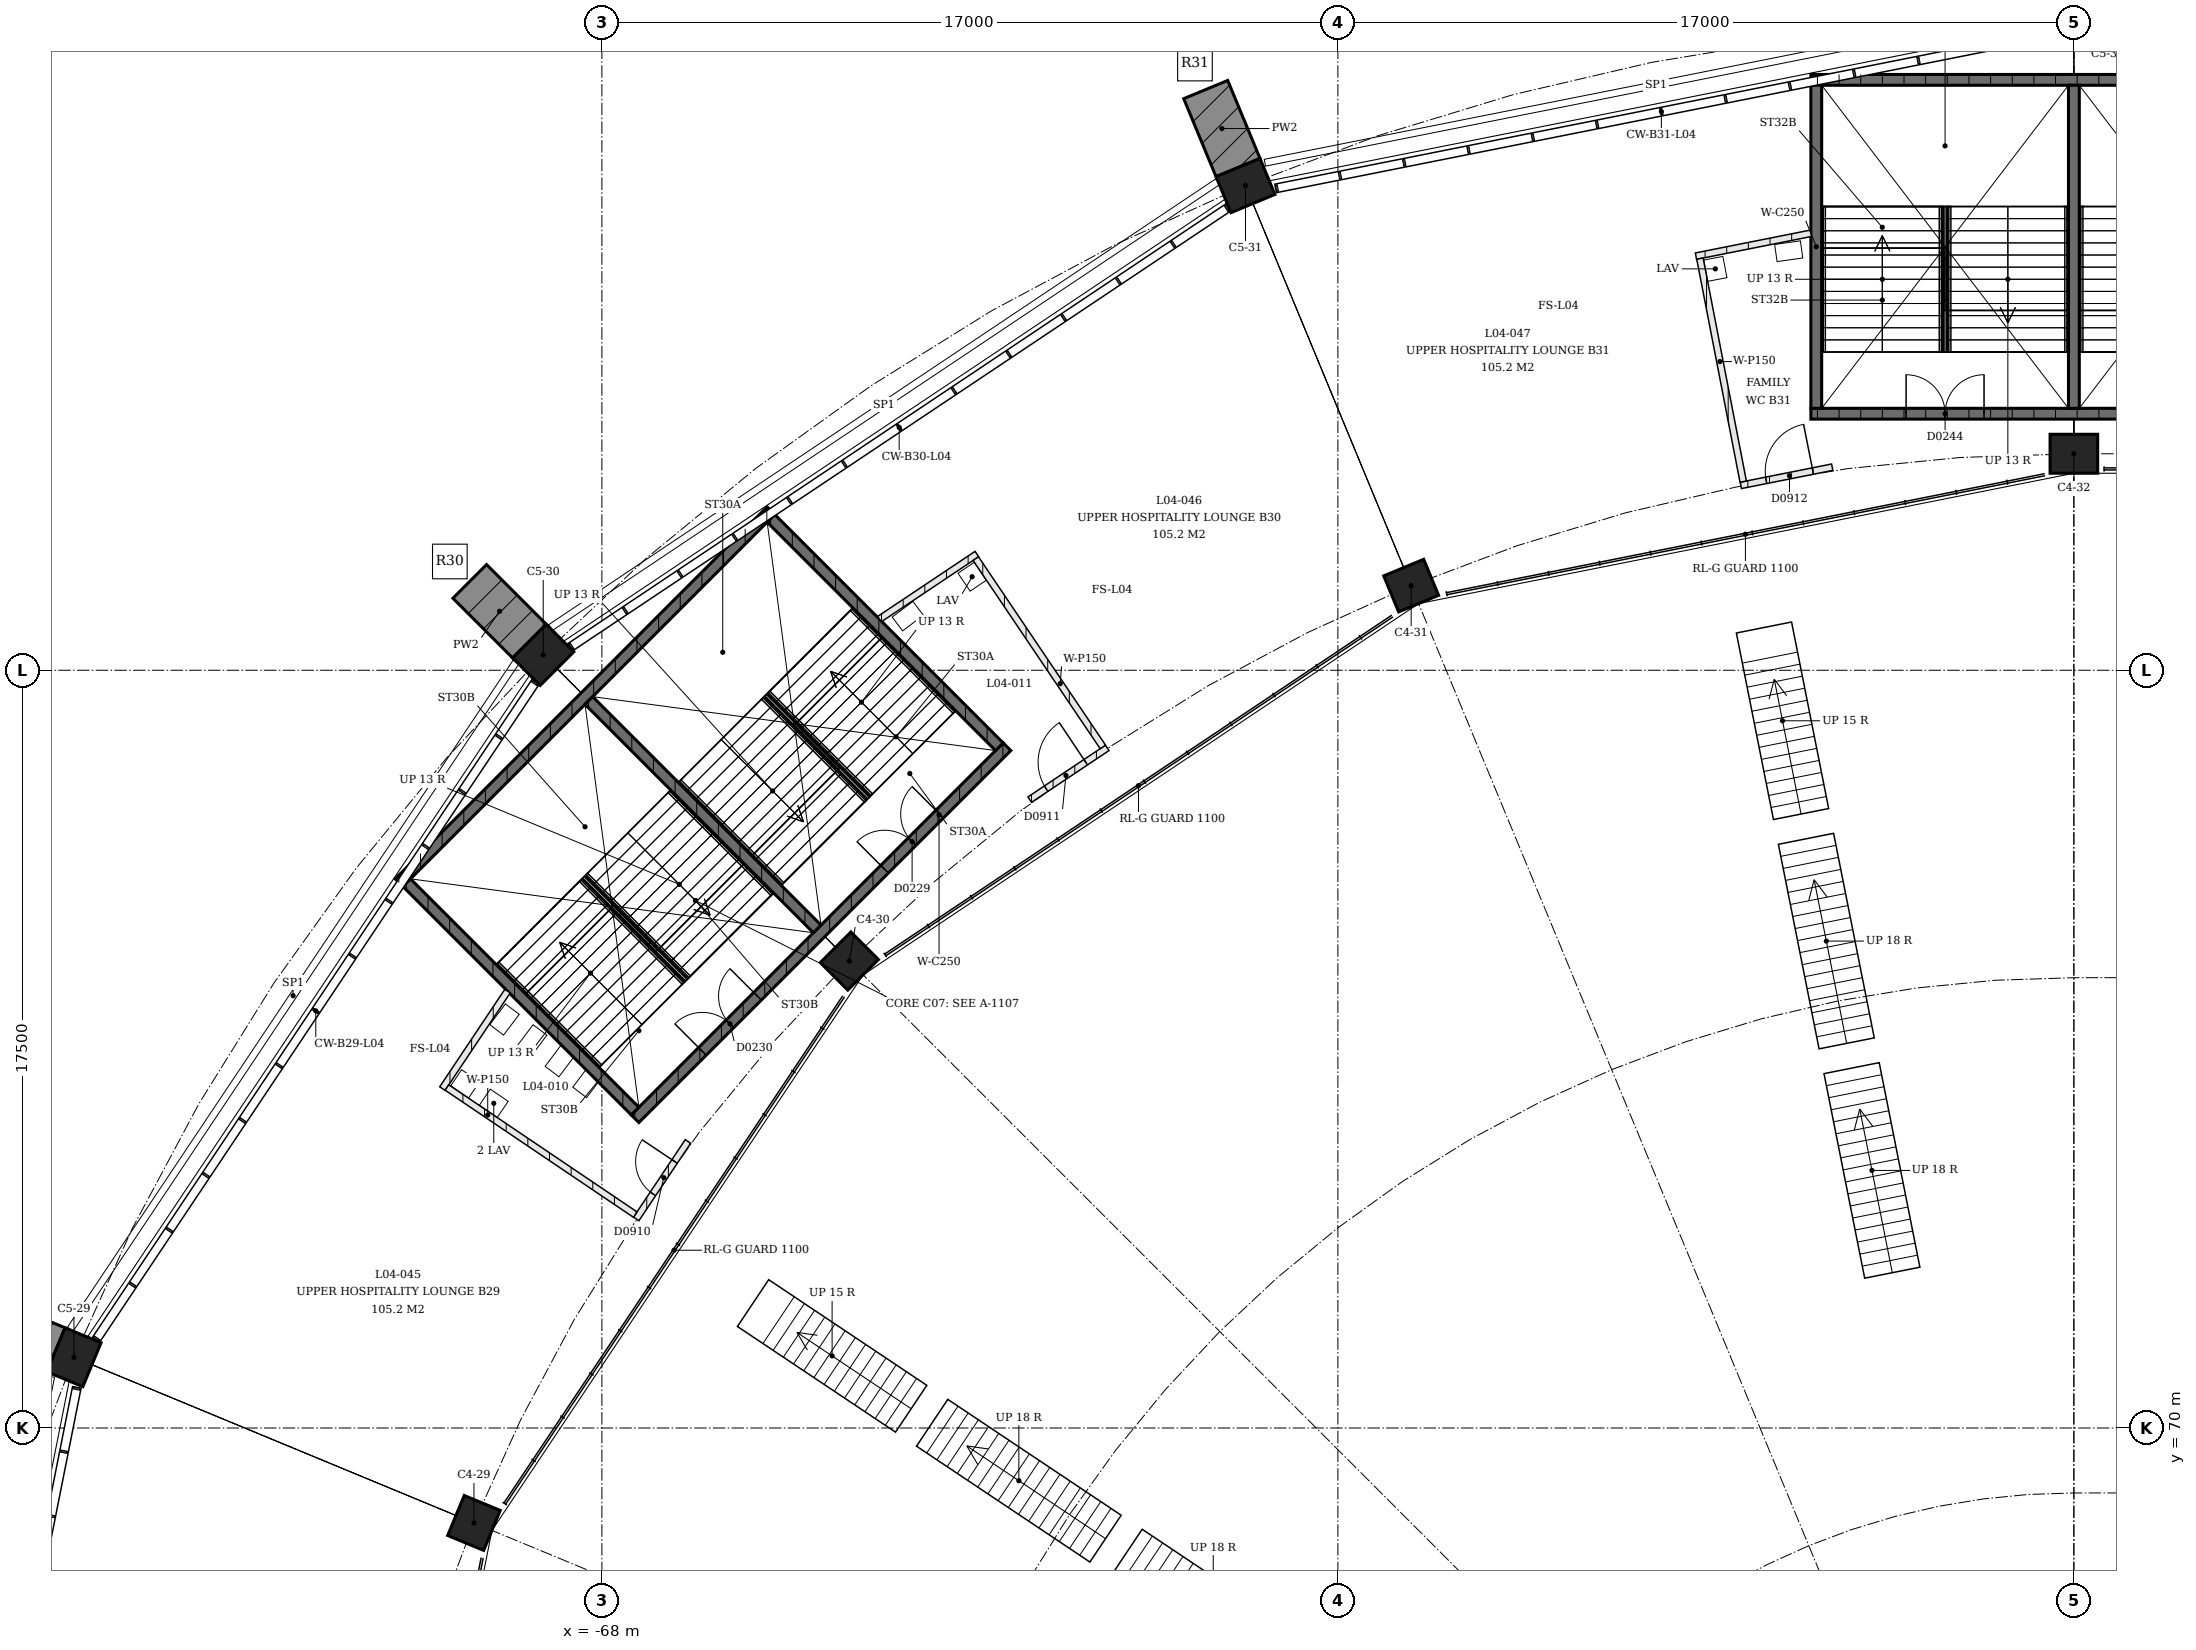
"""IFC4 building model, lengths in metres.
Left out: names, types, materials, properties, quantities, classifications, styles, units other than length and angle.
Written with IfcOpenShell. Run it as: python <this file> out.ifc"""

import sys

from ifc_helpers import new_model, si_unit, direction, frame, frame_2d, origin, origin_2d, place, context, subcontext, project, spatial, rectangle, extrude, element, fill, save


model = new_model("IFC4")
c1 = context("Model", 3, precision=1e-05, world=origin(), true_north=direction((0.0, 1.0)))
c2 = subcontext(c1, "Body", "Model", "MODEL_VIEW")
j1 = project(units=[si_unit("LENGTHUNIT", "METRE"), si_unit("PLANEANGLEUNIT", "RADIAN")], contexts=[c1])
p1 = place(None, origin())
s1 = spatial("IfcSite", under=j1, at=p1, CompositionType="ELEMENT")
p2 = place(p1, origin())
s2 = spatial("IfcBuilding", under=s1, at=p2, CompositionType="ELEMENT")
p3 = place(p2, frame((0.0, 0.0, 18.0)))
s3 = spatial("IfcBuildingStorey", under=s2, at=p3, CompositionType="ELEMENT", Elevation=18.0)
p4 = place(p3, frame((-70.955, 67.807, 0.0), z_axis=(0.0, 0.0, 1.0), x_axis=(-0.382683432365, -0.923879532511, 0.0)))
e1 = element("IfcColumn", 1, at=p4, inside=s3, PredefinedType="COLUMN", context=c2, shape_type="SweptSolid", body=[
    extrude(rectangle(XDim=1.0, YDim=0.9, at=origin_2d()), origin(), (0.0, 0.0, 1.0), 4.5),
])
p5 = place(p3, frame((-80.194, 71.634, 0.0), z_axis=(0.0, 0.0, 1.0), x_axis=(-0.382683432365, -0.923879532511, 0.0)))
e2 = element("IfcColumn", 2, at=p5, inside=s3, PredefinedType="COLUMN", context=c2, shape_type="SweptSolid", body=[
    extrude(rectangle(XDim=1.1, YDim=0.9, at=origin_2d()), origin(), (0.0, 0.0, 1.0), 4.5),
])
p6 = place(p3, frame((-62.284, 80.784, 0.0), z_axis=(0.0, 0.0, 1.0), x_axis=(-0.707106781187, -0.707106781187, 0.0)))
e3 = element("IfcColumn", 3, at=p6, inside=s3, PredefinedType="COLUMN", context=c2, shape_type="SweptSolid", body=[
    extrude(rectangle(XDim=1.0, YDim=0.9, at=origin_2d()), origin(), (0.0, 0.0, 1.0), 4.5),
])
p7 = place(p3, frame((-69.355, 87.855, 0.0), z_axis=(0.0, 0.0, 1.0), x_axis=(-0.707106781187, -0.707106781187, 0.0)))
e4 = element("IfcColumn", 4, at=p7, inside=s3, PredefinedType="COLUMN", context=c2, shape_type="SweptSolid", body=[
    extrude(rectangle(XDim=1.1, YDim=0.9, at=origin_2d()), origin(), (0.0, 0.0, 1.0), 4.5),
])
p8 = place(p3, frame((-49.307, 89.455, 0.0), z_axis=(0.0, 0.0, 1.0), x_axis=(-0.923879532511, -0.382683432365, 0.0)))
e5 = element("IfcColumn", 5, at=p8, inside=s3, PredefinedType="COLUMN", context=c2, shape_type="SweptSolid", body=[
    extrude(rectangle(XDim=1.0, YDim=0.9, at=origin_2d()), origin(), (0.0, 0.0, 1.0), 4.5),
])
for number, where, z_axis, x_axis in (
    (6, (-53.134, 98.694, 0.0), (0.0, 0.0, 1.0), (-0.924, -0.383, 0.0)),
    (7, (-34.0, 92.5, 0.0), (0.0, 0.0, 1.0), (-1.0, 0.0, 0.0)),
):
    element("IfcColumn", number, at=place(p3, frame(where, z_axis=z_axis, x_axis=x_axis)), inside=s3, PredefinedType="COLUMN", context=c2, shape_type="SweptSolid", body=[
        extrude(rectangle(XDim=1.1, YDim=0.9, at=origin_2d()), origin(), (0.0, 0.0, 1.0), 4.5),
    ])
p9 = place(p3, frame((-58.643, 85.734, 0.0), z_axis=(0.0, 0.0, 1.0), x_axis=(-0.707106781187, -0.707106781187, 0.0)))
e8 = element("IfcWall", 8, at=p9, inside=s3, PredefinedType="SHEAR", context=c2, shape_type="SweptSolid", body=[
    extrude(rectangle(XDim=12.15, YDim=0.25, at=frame_2d((6.075, 0.0))), origin(), (0.0, 0.0, 1.0), 4.09),
])
p10 = place(p9, frame((2.2, 0.0, 0.0)))
e9 = element("IfcOpeningElement", 9, at=p10, cuts=e8, PredefinedType="OPENING", context=c2, shape_type="SweptSolid", body=[
    extrude(rectangle(XDim=1.8, YDim=2.1, at=frame_2d((0.9, 1.05))), frame((0.0, 0.125, 0.0), z_axis=(0.0, -1.0, 0.0), x_axis=(1.0, 0.0, 0.0)), (0.0, 0.0, 1.0), 0.25),
])
p11 = place(p9, frame((8.15, 0.0, 0.0)))
e10 = element("IfcOpeningElement", 10, at=p11, cuts=e8, PredefinedType="OPENING", context=c2, shape_type="SweptSolid", body=[
    extrude(rectangle(XDim=1.8, YDim=2.1, at=frame_2d((0.9, 1.05))), frame((0.0, 0.125, 0.0), z_axis=(0.0, -1.0, 0.0), x_axis=(1.0, 0.0, 0.0)), (0.0, 0.0, 1.0), 0.25),
])
p12 = place(p3, frame((-64.094, 91.186, 0.0), z_axis=(0.0, 0.0, 1.0), x_axis=(-0.707106781187, -0.707106781187, 0.0)))
e11 = element("IfcWall", 11, at=p12, inside=s3, PredefinedType="SHEAR", context=c2, shape_type="SweptSolid", body=[
    extrude(rectangle(XDim=12.15, YDim=0.25, at=frame_2d((6.075, 0.0))), origin(), (0.0, 0.0, 1.0), 4.09),
])
for number, where, z_axis, x_axis in (
    (12, (-58.819, 85.734, 0.0), (0.0, 0.0, 1.0), (-0.707, 0.707, 0.0)),
    (13, (-67.234, 77.319, 0.0), (0.0, 0.0, 1.0), (-0.707, 0.707, 0.0)),
):
    element("IfcWall", number, at=place(p3, frame(where, z_axis=z_axis, x_axis=x_axis)), inside=s3, PredefinedType="SHEAR", context=c2, shape_type="SweptSolid", body=[
        extrude(rectangle(XDim=7.46, YDim=0.25, at=frame_2d((3.73, 0.0))), origin(), (0.0, 0.0, 1.0), 4.09),
    ])
p13 = place(p3, frame((-63.027, 81.527, 0.0), z_axis=(0.0, 0.0, 1.0), x_axis=(-0.707106781187, 0.707106781187, 0.0)))
e14 = element("IfcWall", 14, at=p13, inside=s3, PredefinedType="SHEAR", context=c2, shape_type="SweptSolid", body=[
    extrude(rectangle(XDim=7.46, YDim=0.25, at=frame_2d((3.73, 0.0))), origin(), (0.0, 0.0, 1.0), 4.09),
])
p14 = place(p3, frame((-27.925, 93.425, 0.0), z_axis=(0.0, 0.0, 1.0), x_axis=(-1.0, 0.0, 0.0)))
e15 = element("IfcWall", 15, at=p14, inside=s3, PredefinedType="SHEAR", context=c2, shape_type="SweptSolid", body=[
    extrude(rectangle(XDim=12.15, YDim=0.25, at=frame_2d((6.075, 0.0))), origin(), (0.0, 0.0, 1.0), 4.09),
])
p15 = place(p14, frame((2.2, 0.0, 0.0)))
e16 = element("IfcOpeningElement", 16, at=p15, cuts=e15, PredefinedType="OPENING", context=c2, shape_type="SweptSolid", body=[
    extrude(rectangle(XDim=1.8, YDim=2.1, at=frame_2d((0.9, 1.05))), frame((0.0, 0.125, 0.0), z_axis=(0.0, -1.0, 0.0), x_axis=(1.0, 0.0, 0.0)), (0.0, 0.0, 1.0), 0.25),
])
p16 = place(p14, frame((8.15, 0.0, 0.0)))
e17 = element("IfcOpeningElement", 17, at=p16, cuts=e15, PredefinedType="OPENING", context=c2, shape_type="SweptSolid", body=[
    extrude(rectangle(XDim=1.8, YDim=2.1, at=frame_2d((0.9, 1.05))), frame((0.0, 0.125, 0.0), z_axis=(0.0, -1.0, 0.0), x_axis=(1.0, 0.0, 0.0)), (0.0, 0.0, 1.0), 0.25),
])
p17 = place(p3, frame((-27.925, 101.135, 0.0), z_axis=(0.0, 0.0, 1.0), x_axis=(-1.0, 0.0, 0.0)))
e18 = element("IfcWall", 18, at=p17, inside=s3, PredefinedType="SHEAR", context=c2, shape_type="SweptSolid", body=[
    extrude(rectangle(XDim=12.15, YDim=0.25, at=frame_2d((6.075, 0.0))), origin(), (0.0, 0.0, 1.0), 4.09),
])
for number, where, z_axis, x_axis in (
    (19, (-39.95, 93.55, 0.0), (0.0, 0.0, 1.0), (0.0, 1.0, 0.0)),
    (20, (-34.0, 93.55, 0.0), (0.0, 0.0, 1.0), (0.0, 1.0, 0.0)),
):
    element("IfcWall", number, at=place(p3, frame(where, z_axis=z_axis, x_axis=x_axis)), inside=s3, PredefinedType="SHEAR", context=c2, shape_type="SweptSolid", body=[
        extrude(rectangle(XDim=7.46, YDim=0.25, at=frame_2d((3.73, 0.0))), origin(), (0.0, 0.0, 1.0), 4.09),
    ])
p18 = place(p3, frame((-66.012, 76.618, 0.0), z_axis=(0.0, 0.0, 1.0), x_axis=(-0.555616271849, -0.831438848297, 0.0)))
e21 = element("IfcWall", 21, at=p18, inside=s3, PredefinedType="PARTITIONING", context=c2, shape_type="SweptSolid", body=[
    extrude(rectangle(XDim=2.152, YDim=0.15, at=frame_2d((1.076, 0.0))), origin(), (0.0, 0.0, 1.0), 3.0),
])
p19 = place(p18, frame((0.556, 0.0, 0.0)))
e22 = element("IfcOpeningElement", 22, at=p19, cuts=e21, PredefinedType="OPENING", context=c2, shape_type="SweptSolid", body=[
    extrude(rectangle(XDim=0.9, YDim=2.1, at=frame_2d((0.45, 1.05))), frame((0.0, 0.075, 0.0), z_axis=(0.0, -1.0, 0.0), x_axis=(1.0, 0.0, 0.0)), (0.0, 0.0, 1.0), 0.15),
])
p20 = place(p3, frame((-70.18, 80.089, 0.0), z_axis=(0.0, 0.0, 1.0), x_axis=(-0.555553352943, -0.831480890961, 0.0)))
e23 = element("IfcWall", 23, at=p20, inside=s3, PredefinedType="PARTITIONING", context=c2, shape_type="SweptSolid", body=[
    extrude(rectangle(XDim=2.707, YDim=0.15, at=frame_2d((1.353, 0.0))), origin(), (0.0, 0.0, 1.0), 3.0),
])
p21 = place(p3, frame((-67.229, 74.928, 0.0), z_axis=(0.0, 0.0, 1.0), x_axis=(-0.8288583832, 0.559458470843, 0.0)))
e24 = element("IfcWall", 24, at=p21, inside=s3, PredefinedType="PARTITIONING", context=c2, shape_type="SweptSolid", body=[
    extrude(rectangle(XDim=5.247, YDim=0.15, at=frame_2d((2.624, 0.0))), origin(), (0.0, 0.0, 1.0), 3.0),
])
p22 = place(p3, frame((-58.118, 84.512, 0.0), z_axis=(0.0, 0.0, 1.0), x_axis=(0.831438848297, 0.555616271849, 0.0)))
e25 = element("IfcWall", 25, at=p22, inside=s3, PredefinedType="PARTITIONING", context=c2, shape_type="SweptSolid", body=[
    extrude(rectangle(XDim=2.152, YDim=0.15, at=frame_2d((1.076, 0.0))), origin(), (0.0, 0.0, 1.0), 3.0),
])
p23 = place(p22, frame((0.456, 0.0, 0.0)))
e26 = element("IfcOpeningElement", 26, at=p23, cuts=e25, PredefinedType="OPENING", context=c2, shape_type="SweptSolid", body=[
    extrude(rectangle(XDim=1.1, YDim=2.1, at=frame_2d((0.55, 1.05))), frame((0.0, 0.075, 0.0), z_axis=(0.0, -1.0, 0.0), x_axis=(1.0, 0.0, 0.0)), (0.0, 0.0, 1.0), 0.15),
])
p24 = place(p3, frame((-61.589, 88.68, 0.0), z_axis=(0.0, 0.0, 1.0), x_axis=(0.831480890961, 0.555553352943, 0.0)))
e27 = element("IfcWall", 27, at=p24, inside=s3, PredefinedType="PARTITIONING", context=c2, shape_type="SweptSolid", body=[
    extrude(rectangle(XDim=2.707, YDim=0.15, at=frame_2d((1.353, 0.0))), origin(), (0.0, 0.0, 1.0), 3.0),
])
p25 = place(p3, frame((-56.428, 85.729, 0.0), z_axis=(0.0, 0.0, 1.0), x_axis=(-0.559458470843, 0.8288583832, 0.0)))
e28 = element("IfcWall", 28, at=p25, inside=s3, PredefinedType="PARTITIONING", context=c2, shape_type="SweptSolid", body=[
    extrude(rectangle(XDim=5.247, YDim=0.15, at=frame_2d((2.624, 0.0))), origin(), (0.0, 0.0, 1.0), 3.0),
])
p26 = place(p3, frame((-39.582, 92.19, 0.0), z_axis=(0.0, 0.0, 1.0), x_axis=(-0.980776540228, -0.195134256702, 0.0)))
e29 = element("IfcWall", 29, at=p26, inside=s3, PredefinedType="PARTITIONING", context=c2, shape_type="SweptSolid", body=[
    extrude(rectangle(XDim=2.152, YDim=0.15, at=frame_2d((1.076, 0.0))), origin(), (0.0, 0.0, 1.0), 3.0),
])
p27 = place(p26, frame((0.456, 0.0, 0.0)))
e30 = element("IfcOpeningElement", 30, at=p27, cuts=e29, PredefinedType="OPENING", context=c2, shape_type="SweptSolid", body=[
    extrude(rectangle(XDim=1.1, YDim=2.1, at=frame_2d((0.55, 1.05))), frame((0.0, 0.075, 0.0), z_axis=(0.0, -1.0, 0.0), x_axis=(1.0, 0.0, 0.0)), (0.0, 0.0, 1.0), 0.15),
])
p28 = place(p3, frame((-40.075, 97.592, 0.0), z_axis=(0.0, 0.0, 1.0), x_axis=(-0.980781382465, -0.195109917251, 0.0)))
e31 = element("IfcWall", 31, at=p28, inside=s3, PredefinedType="PARTITIONING", context=c2, shape_type="SweptSolid", body=[
    extrude(rectangle(XDim=2.707, YDim=0.15, at=frame_2d((1.353, 0.0))), origin(), (0.0, 0.0, 1.0), 3.0),
])
p29 = place(p3, frame((-41.638, 91.856, 0.0), z_axis=(0.0, 0.0, 1.0), x_axis=(-0.190529669063, 0.981681437742, 0.0)))
e32 = element("IfcWall", 32, at=p29, inside=s3, PredefinedType="PARTITIONING", context=c2, shape_type="SweptSolid", body=[
    extrude(rectangle(XDim=5.247, YDim=0.15, at=frame_2d((2.624, 0.0))), origin(), (0.0, 0.0, 1.0), 3.0),
])
p30 = place(p10, origin())
e33 = element("IfcDoor", 33, at=p30, inside=s3, OperationType="DOUBLE_DOOR_SINGLE_SWING", PredefinedType="DOOR", context=c2, shape_type="SweptSolid", body=[
    extrude(rectangle(XDim=1.8, YDim=2.1, at=frame_2d((0.9, 1.05))), frame((0.0, 0.025, 0.0), z_axis=(0.0, -1.0, 0.0), x_axis=(1.0, 0.0, 0.0)), (0.0, 0.0, 1.0), 0.05),
])
fill(e9, e33)
p31 = place(p11, origin())
e34 = element("IfcDoor", 34, at=p31, inside=s3, OperationType="DOUBLE_DOOR_SINGLE_SWING", PredefinedType="DOOR", context=c2, shape_type="SweptSolid", body=[
    extrude(rectangle(XDim=1.8, YDim=2.1, at=frame_2d((0.9, 1.05))), frame((0.0, 0.025, 0.0), z_axis=(0.0, -1.0, 0.0), x_axis=(1.0, 0.0, 0.0)), (0.0, 0.0, 1.0), 0.05),
])
fill(e10, e34)
p32 = place(p16, origin())
e35 = element("IfcDoor", 35, at=p32, inside=s3, OperationType="DOUBLE_DOOR_SINGLE_SWING", PredefinedType="DOOR", context=c2, shape_type="SweptSolid", body=[
    extrude(rectangle(XDim=1.8, YDim=2.1, at=frame_2d((0.9, 1.05))), frame((0.0, 0.025, 0.0), z_axis=(0.0, -1.0, 0.0), x_axis=(1.0, 0.0, 0.0)), (0.0, 0.0, 1.0), 0.05),
])
fill(e17, e35)
p33 = place(p19, origin())
e36 = element("IfcDoor", 36, at=p33, inside=s3, OperationType="SINGLE_SWING_LEFT", PredefinedType="DOOR", context=c2, shape_type="SweptSolid", body=[
    extrude(rectangle(XDim=0.9, YDim=2.1, at=frame_2d((0.45, 1.05))), frame((0.0, 0.025, 0.0), z_axis=(0.0, -1.0, 0.0), x_axis=(1.0, 0.0, 0.0)), (0.0, 0.0, 1.0), 0.05),
])
fill(e22, e36)
p34 = place(p23, origin())
e37 = element("IfcDoor", 37, at=p34, inside=s3, OperationType="SINGLE_SWING_LEFT", PredefinedType="DOOR", context=c2, shape_type="SweptSolid", body=[
    extrude(rectangle(XDim=1.1, YDim=2.1, at=frame_2d((0.55, 1.05))), frame((0.0, 0.025, 0.0), z_axis=(0.0, -1.0, 0.0), x_axis=(1.0, 0.0, 0.0)), (0.0, 0.0, 1.0), 0.05),
])
fill(e26, e37)
p35 = place(p27, origin())
e38 = element("IfcDoor", 38, at=p35, inside=s3, OperationType="SINGLE_SWING_LEFT", PredefinedType="DOOR", context=c2, shape_type="SweptSolid", body=[
    extrude(rectangle(XDim=1.1, YDim=2.1, at=frame_2d((0.55, 1.05))), frame((0.0, 0.025, 0.0), z_axis=(0.0, -1.0, 0.0), x_axis=(1.0, 0.0, 0.0)), (0.0, 0.0, 1.0), 0.05),
])
fill(e30, e38)
save(model, sys.argv[1])
